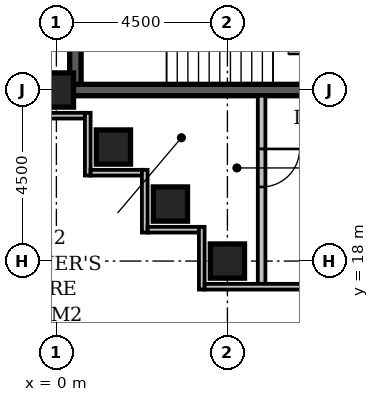
"""IFC4 building model, lengths in metres.
Left out: names, types, materials, properties, quantities, classifications, styles, units other than length and angle.
Written with IfcOpenShell. Run it as: python <this file> out.ifc"""

import sys

from ifc_helpers import new_model, si_unit, direction, frame, frame_2d, origin, origin_2d, place, context, subcontext, project, spatial, rectangle, extrude, element, fill, save


model = new_model("IFC4")
c1 = context("Model", 3, precision=1e-05, world=origin(), true_north=direction((0.0, 1.0)))
c2 = subcontext(c1, "Body", "Model", "MODEL_VIEW")
j1 = project(units=[si_unit("LENGTHUNIT", "METRE"), si_unit("PLANEANGLEUNIT", "RADIAN")], contexts=[c1])
p1 = place(None, origin())
s1 = spatial("IfcSite", under=j1, at=p1, CompositionType="ELEMENT")
p2 = place(p1, origin())
s2 = spatial("IfcBuilding", under=s1, at=p2, CompositionType="ELEMENT")
p3 = place(p2, frame((0.0, 0.0, 211.4)))
s3 = spatial("IfcBuildingStorey", under=s2, at=p3, CompositionType="ELEMENT", Elevation=211.4)
p4 = place(p3, frame((0.35, 22.5, -0.35), z_axis=(0.0, 0.0, 1.0), x_axis=(1.0, 0.0, 0.0)))
e1 = element("IfcWall", 1, at=p4, inside=s3, PredefinedType="SHEAR", context=c2, shape_type="SweptSolid", body=[
    extrude(rectangle(XDim=7.0, YDim=0.3, at=frame_2d((3.5, 0.0))), origin(), (0.0, 0.0, 1.0), 3.65),
])
p5 = place(p3, frame((0.5, 22.65, -0.35), z_axis=(0.0, 0.0, 1.0), x_axis=(0.0, 1.0, 0.0)))
e2 = element("IfcWall", 2, at=p5, inside=s3, PredefinedType="SHEAR", context=c2, shape_type="SweptSolid", body=[
    extrude(rectangle(XDim=4.2, YDim=0.3, at=frame_2d((2.1, 0.0))), origin(), (0.0, 0.0, 1.0), 3.65),
])
for number, where, z_axis, x_axis in (
    (3, (4.5, 18.0, -0.35), (0.0, 0.0, 1.0), (1.0, 0.0, 0.0)),
    (4, (3.0, 19.5, -0.35), (0.0, 0.0, 1.0), (1.0, 0.0, 0.0)),
    (5, (1.5, 21.0, -0.35), (0.0, 0.0, 1.0), (1.0, 0.0, 0.0)),
    (6, (0.0, 22.5, -0.35), (0.0, 0.0, 1.0), (1.0, 0.0, 0.0)),
):
    element("IfcColumn", number, at=place(p3, frame(where, z_axis=z_axis, x_axis=x_axis)), inside=s3, PredefinedType="COLUMN", context=c2, shape_type="SweptSolid", body=[
        extrude(rectangle(XDim=0.9, YDim=0.9, at=origin_2d()), origin(), (0.0, 0.0, 1.0), 3.65),
    ])
p6 = place(p3, frame((-0.6, 21.825, 0.0), z_axis=(0.0, 0.0, 1.0), x_axis=(1.0, 0.0, 0.0)))
e7 = element("IfcWall", 7, at=p6, inside=s3, PredefinedType="STANDARD", context=c2, shape_type="SweptSolid", body=[
    extrude(rectangle(XDim=1.35, YDim=0.15, at=frame_2d((0.675, 0.0))), origin(), (0.0, 0.0, 1.0), 2.7),
])
p7 = place(p3, frame((0.825, 21.9, 0.0), z_axis=(0.0, 0.0, 1.0), x_axis=(0.0, -1.0, 0.0)))
e8 = element("IfcWall", 8, at=p7, inside=s3, PredefinedType="STANDARD", context=c2, shape_type="SweptSolid", body=[
    extrude(rectangle(XDim=1.65, YDim=0.15, at=frame_2d((0.825, 0.0))), origin(), (0.0, 0.0, 1.0), 2.7),
])
p8 = place(p3, frame((0.9, 20.325, 0.0), z_axis=(0.0, 0.0, 1.0), x_axis=(1.0, 0.0, 0.0)))
e9 = element("IfcWall", 9, at=p8, inside=s3, PredefinedType="STANDARD", context=c2, shape_type="SweptSolid", body=[
    extrude(rectangle(XDim=1.35, YDim=0.15, at=frame_2d((0.675, 0.0))), origin(), (0.0, 0.0, 1.0), 2.7),
])
p9 = place(p3, frame((2.325, 20.4, 0.0), z_axis=(0.0, 0.0, 1.0), x_axis=(0.0, -1.0, 0.0)))
e10 = element("IfcWall", 10, at=p9, inside=s3, PredefinedType="STANDARD", context=c2, shape_type="SweptSolid", body=[
    extrude(rectangle(XDim=1.65, YDim=0.15, at=frame_2d((0.825, 0.0))), origin(), (0.0, 0.0, 1.0), 2.7),
])
p10 = place(p3, frame((2.4, 18.825, 0.0), z_axis=(0.0, 0.0, 1.0), x_axis=(1.0, 0.0, 0.0)))
e11 = element("IfcWall", 11, at=p10, inside=s3, PredefinedType="STANDARD", context=c2, shape_type="SweptSolid", body=[
    extrude(rectangle(XDim=1.35, YDim=0.15, at=frame_2d((0.675, 0.0))), origin(), (0.0, 0.0, 1.0), 2.7),
])
p11 = place(p3, frame((3.825, 18.9, 0.0), z_axis=(0.0, 0.0, 1.0), x_axis=(0.0, -1.0, 0.0)))
e12 = element("IfcWall", 12, at=p11, inside=s3, PredefinedType="STANDARD", context=c2, shape_type="SweptSolid", body=[
    extrude(rectangle(XDim=1.65, YDim=0.15, at=frame_2d((0.825, 0.0))), origin(), (0.0, 0.0, 1.0), 2.7),
])
p12 = place(p3, frame((3.9, 17.325, 0.0), z_axis=(0.0, 0.0, 1.0), x_axis=(1.0, 0.0, 0.0)))
e13 = element("IfcWall", 13, at=p12, inside=s3, PredefinedType="STANDARD", context=c2, shape_type="SweptSolid", body=[
    extrude(rectangle(XDim=19.35, YDim=0.15, at=frame_2d((9.675, 0.0))), origin(), (0.0, 0.0, 1.0), 2.7),
])
p13 = place(p12, frame((11.8, 0.0, 0.0)))
e14 = element("IfcOpeningElement", 14, at=p13, cuts=e13, PredefinedType="OPENING", context=c2, shape_type="SweptSolid", body=[
    extrude(rectangle(XDim=1.2, YDim=2.4, at=frame_2d((0.6, 1.2))), frame((0.0, 0.087, 0.0), z_axis=(0.0, -1.0, 0.0), x_axis=(1.0, 0.0, 0.0)), (0.0, 0.0, 1.0), 0.174),
])
p14 = place(p12, frame((15.15, 0.0, 0.6)))
e15 = element("IfcOpeningElement", 15, at=p14, cuts=e13, PredefinedType="OPENING", context=c2, shape_type="SweptSolid", body=[
    extrude(rectangle(XDim=2.4, YDim=1.8, at=frame_2d((1.2, 0.9))), frame((0.0, 0.087, 0.0), z_axis=(0.0, -1.0, 0.0), x_axis=(1.0, 0.0, 0.0)), (0.0, 0.0, 1.0), 0.174),
])
p15 = place(p3, frame((5.4, 17.4, 0.0), z_axis=(0.0, 0.0, 1.0), x_axis=(0.0, 1.0, 0.0)))
e16 = element("IfcWall", 16, at=p15, inside=s3, PredefinedType="PARTITIONING", context=c2, shape_type="SweptSolid", body=[
    extrude(rectangle(XDim=4.95, YDim=0.2, at=frame_2d((2.475, 0.0))), origin(), (0.0, 0.0, 1.0), 3.3),
])
p16 = place(p15, frame((2.55, 0.0, 0.0)))
e17 = element("IfcOpeningElement", 17, at=p16, cuts=e16, PredefinedType="OPENING", context=c2, shape_type="SweptSolid", body=[
    extrude(rectangle(XDim=1.0, YDim=2.1, at=frame_2d((0.5, 1.05))), frame((0.0, 0.112, 0.0), z_axis=(0.0, -1.0, 0.0), x_axis=(1.0, 0.0, 0.0)), (0.0, 0.0, 1.0), 0.224),
])
p17 = place(p16, origin())
e18 = element("IfcDoor", 18, at=p17, inside=s3, OperationType="SINGLE_SWING_RIGHT", PredefinedType="DOOR", context=c2, shape_type="SweptSolid", body=[
    extrude(rectangle(XDim=1.0, YDim=2.1, at=frame_2d((0.5, 1.05))), frame((0.0, 0.025, 0.0), z_axis=(0.0, -1.0, 0.0), x_axis=(1.0, 0.0, 0.0)), (0.0, 0.0, 1.0), 0.05),
])
fill(e17, e18)
save(model, sys.argv[1])
